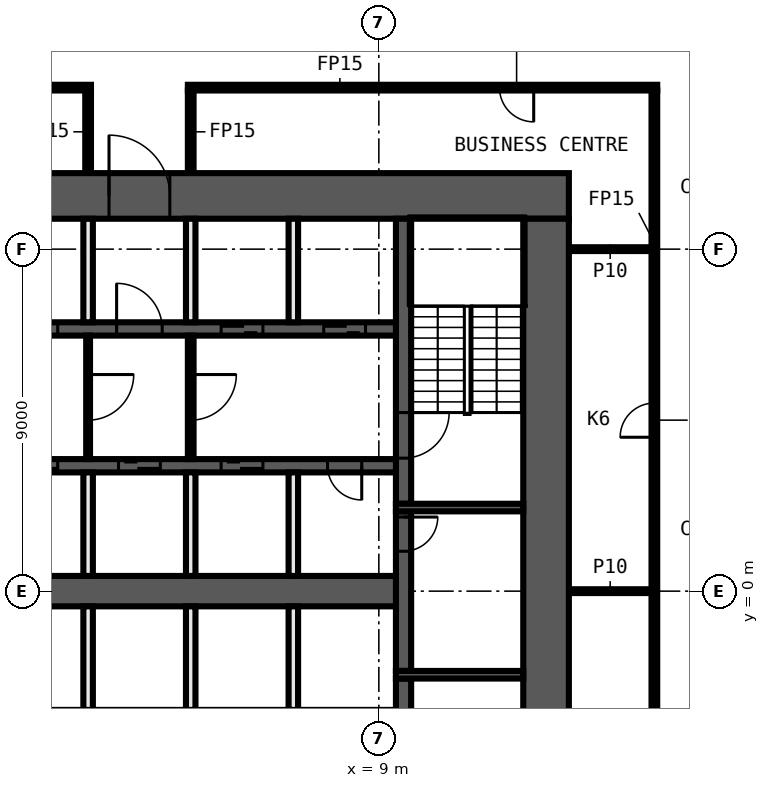
"""IFC4 building model, lengths in metres.
Left out: names, types, materials, properties, quantities, classifications, styles, units other than length and angle.
Written with IfcOpenShell. Run it as: python <this file> out.ifc"""

import sys

from ifc_helpers import new_model, si_unit, direction, frame, frame_2d, origin, place, context, subcontext, project, spatial, rectangle, extrude, element, fill, save


model = new_model("IFC4")
c1 = context("Model", 3, precision=1e-05, world=origin(), true_north=direction((0.0, 1.0)))
c2 = subcontext(c1, "Body", "Model", "MODEL_VIEW")
j1 = project(units=[si_unit("LENGTHUNIT", "METRE"), si_unit("PLANEANGLEUNIT", "RADIAN")], contexts=[c1])
p1 = place(None, origin())
s1 = spatial("IfcSite", under=j1, at=p1, CompositionType="ELEMENT")
p2 = place(p1, origin())
s2 = spatial("IfcBuilding", under=s1, at=p2, CompositionType="ELEMENT")
p3 = place(p2, frame((0.0, 0.0, 44.0)))
s3 = spatial("IfcBuildingStorey", under=s2, at=p3, CompositionType="ELEMENT", Elevation=44.0)
for number, where, z_axis, x_axis in (
    (1, (14.0, 0.0, 0.0), (0.0, 0.0, 1.0), (1.0, 0.0, 0.0)),
    (2, (14.0, 9.0, 0.0), (0.0, 0.0, 1.0), (1.0, 0.0, 0.0)),
):
    element("IfcWall", number, at=place(p3, frame(where, z_axis=z_axis, x_axis=x_axis)), inside=s3, PredefinedType="PARTITIONING", context=c2, shape_type="SweptSolid", body=[
        extrude(rectangle(XDim=2.175, YDim=0.1, at=frame_2d((1.087, 0.0))), origin(), (0.0, 0.0, 1.0), 3.3),
    ])
p4 = place(p3, frame((1.425, 13.25, 0.0), z_axis=(0.0, 0.0, 1.0), x_axis=(-1.0, 0.0, 0.0)))
e3 = element("IfcWall", 3, at=p4, inside=s3, PredefinedType="PARTITIONING", context=c2, shape_type="SweptSolid", body=[
    extrude(rectangle(XDim=17.75, YDim=0.15, at=frame_2d((8.875, 0.0))), origin(), (0.0, 0.0, 1.0), 3.3),
])
p5 = place(p4, frame((5.475, 0.0, 0.0)))
e4 = element("IfcOpeningElement", 4, at=p5, cuts=e3, PredefinedType="OPENING", context=c2, shape_type="SweptSolid", body=[
    extrude(rectangle(XDim=0.9, YDim=2.1, at=frame_2d((0.45, 1.05))), frame((0.0, 0.085, 0.0), z_axis=(0.0, -1.0, 0.0), x_axis=(1.0, 0.0, 0.0)), (0.0, 0.0, 1.0), 0.17),
])
p6 = place(p4, frame((13.6, 0.0, 0.0)))
e5 = element("IfcOpeningElement", 5, at=p6, cuts=e3, PredefinedType="OPENING", context=c2, shape_type="SweptSolid", body=[
    extrude(rectangle(XDim=0.9, YDim=2.1, at=frame_2d((0.45, 1.05))), frame((0.0, 0.085, 0.0), z_axis=(0.0, -1.0, 0.0), x_axis=(1.0, 0.0, 0.0)), (0.0, 0.0, 1.0), 0.17),
])
p7 = place(p3, frame((16.325, 13.25, 0.0), z_axis=(0.0, 0.0, 1.0), x_axis=(-1.0, 0.0, 0.0)))
e6 = element("IfcWall", 6, at=p7, inside=s3, PredefinedType="PARTITIONING", context=c2, shape_type="SweptSolid", body=[
    extrude(rectangle(XDim=12.35, YDim=0.15, at=frame_2d((6.175, 0.0))), origin(), (0.0, 0.0, 1.0), 3.3),
])
p8 = place(p7, frame((3.25, 0.0, 0.0)))
e7 = element("IfcOpeningElement", 7, at=p8, cuts=e6, PredefinedType="OPENING", context=c2, shape_type="SweptSolid", body=[
    extrude(rectangle(XDim=0.9, YDim=2.1, at=frame_2d((0.45, 1.05))), frame((0.0, 0.085, 0.0), z_axis=(0.0, -1.0, 0.0), x_axis=(1.0, 0.0, 0.0)), (0.0, 0.0, 1.0), 0.17),
])
p9 = place(p3, frame((16.25, -13.175, 0.0), z_axis=(0.0, 0.0, 1.0), x_axis=(0.0, 1.0, 0.0)))
e8 = element("IfcWall", 8, at=p9, inside=s3, PredefinedType="PARTITIONING", context=c2, shape_type="SweptSolid", body=[
    extrude(rectangle(XDim=26.35, YDim=0.15, at=frame_2d((13.175, 0.0))), origin(), (0.0, 0.0, 1.0), 3.3),
])
p10 = place(p9, frame((8.225, 0.0, 0.0)))
e9 = element("IfcOpeningElement", 9, at=p10, cuts=e8, PredefinedType="OPENING", context=c2, shape_type="SweptSolid", body=[
    extrude(rectangle(XDim=0.9, YDim=2.1, at=frame_2d((0.45, 1.05))), frame((0.0, 0.085, 0.0), z_axis=(0.0, -1.0, 0.0), x_axis=(1.0, 0.0, 0.0)), (0.0, 0.0, 1.0), 0.17),
])
p11 = place(p9, frame((17.225, 0.0, 0.0)))
e10 = element("IfcOpeningElement", 10, at=p11, cuts=e8, PredefinedType="OPENING", context=c2, shape_type="SweptSolid", body=[
    extrude(rectangle(XDim=0.9, YDim=2.1, at=frame_2d((0.45, 1.05))), frame((0.0, 0.085, 0.0), z_axis=(0.0, -1.0, 0.0), x_axis=(1.0, 0.0, 0.0)), (0.0, 0.0, 1.0), 0.17),
])
for number, where, z_axis, x_axis in (
    (11, (4.05, 11.0, 0.0), (0.0, 0.0, 1.0), (0.0, 1.0, 0.0)),
    (12, (1.35, 11.0, 0.0), (0.0, 0.0, 1.0), (0.0, 1.0, 0.0)),
):
    element("IfcWall", number, at=place(p3, frame(where, z_axis=z_axis, x_axis=x_axis)), inside=s3, PredefinedType="PARTITIONING", context=c2, shape_type="SweptSolid", body=[
        extrude(rectangle(XDim=2.175, YDim=0.15, at=frame_2d((1.087, 0.0))), origin(), (0.0, 0.0, 1.0), 3.3),
    ])
p12 = place(p3, frame((-14.0, 10.4, 0.0), z_axis=(0.0, 0.0, 1.0), x_axis=(1.0, 0.0, 0.0)))
e13 = element("IfcWall", 13, at=p12, inside=s3, PredefinedType="SHEAR", context=c2, shape_type="SweptSolid", body=[
    extrude(rectangle(XDim=28.0, YDim=1.2, at=frame_2d((14.0, 0.0))), origin(), (0.0, 0.0, 1.0), 3.3),
])
p13 = place(p12, frame((15.9, 0.0, 0.0)))
e14 = element("IfcOpeningElement", 14, at=p13, cuts=e13, PredefinedType="OPENING", context=c2, shape_type="SweptSolid", body=[
    extrude(rectangle(XDim=1.6, YDim=2.1, at=frame_2d((0.8, 1.05))), frame((0.0, 0.61, 0.0), z_axis=(0.0, -1.0, 0.0), x_axis=(1.0, 0.0, 0.0)), (0.0, 0.0, 1.0), 1.22),
])
p14 = place(p3, frame((13.4, 9.8, 0.0), z_axis=(0.0, 0.0, 1.0), x_axis=(0.0, -1.0, 0.0)))
e15 = element("IfcWall", 15, at=p14, inside=s3, PredefinedType="SHEAR", context=c2, shape_type="SweptSolid", body=[
    extrude(rectangle(XDim=19.6, YDim=1.2, at=frame_2d((9.8, 0.0))), origin(), (0.0, 0.0, 1.0), 3.3),
])
p15 = place(p3, frame((9.65, -2.3, 0.0), z_axis=(0.0, 0.0, 1.0), x_axis=(0.0, -1.0, 0.0)))
e16 = element("IfcWall", 16, at=p15, inside=s3, PredefinedType="SHEAR", context=c2, shape_type="SweptSolid", body=[
    extrude(rectangle(XDim=7.5, YDim=0.4, at=frame_2d((3.75, 0.0))), origin(), (0.0, 0.0, 1.0), 3.3),
])
p16 = place(p15, frame((1.2, 0.0, 0.0)))
e17 = element("IfcOpeningElement", 17, at=p16, cuts=e16, PredefinedType="OPENING", context=c2, shape_type="SweptSolid", body=[
    extrude(rectangle(XDim=1.2, YDim=2.1, at=frame_2d((0.6, 1.05))), frame((0.0, 0.21, 0.0), z_axis=(0.0, -1.0, 0.0), x_axis=(1.0, 0.0, 0.0)), (0.0, 0.0, 1.0), 0.42),
])
p17 = place(p3, frame((9.65, 2.1, 0.0), z_axis=(0.0, 0.0, 1.0), x_axis=(0.0, -1.0, 0.0)))
e18 = element("IfcWall", 18, at=p17, inside=s3, PredefinedType="SHEAR", context=c2, shape_type="SweptSolid", body=[
    extrude(rectangle(XDim=4.2, YDim=0.4, at=frame_2d((2.1, 0.0))), origin(), (0.0, 0.0, 1.0), 3.3),
])
p18 = place(p17, frame((0.15, 0.0, 0.0)))
e19 = element("IfcOpeningElement", 19, at=p18, cuts=e18, PredefinedType="OPENING", context=c2, shape_type="SweptSolid", body=[
    extrude(rectangle(XDim=0.9, YDim=2.1, at=frame_2d((0.45, 1.05))), frame((0.0, 0.21, 0.0), z_axis=(0.0, -1.0, 0.0), x_axis=(1.0, 0.0, 0.0)), (0.0, 0.0, 1.0), 0.42),
])
p19 = place(p3, frame((9.65, 9.8, 0.0), z_axis=(0.0, 0.0, 1.0), x_axis=(0.0, -1.0, 0.0)))
e20 = element("IfcWall", 20, at=p19, inside=s3, PredefinedType="SHEAR", context=c2, shape_type="SweptSolid", body=[
    extrude(rectangle(XDim=7.5, YDim=0.4, at=frame_2d((3.75, 0.0))), origin(), (0.0, 0.0, 1.0), 3.3),
])
p20 = place(p19, frame((5.1, 0.0, 0.0)))
e21 = element("IfcOpeningElement", 21, at=p20, cuts=e20, PredefinedType="OPENING", context=c2, shape_type="SweptSolid", body=[
    extrude(rectangle(XDim=1.2, YDim=2.1, at=frame_2d((0.6, 1.05))), frame((0.0, 0.21, 0.0), z_axis=(0.0, -1.0, 0.0), x_axis=(1.0, 0.0, 0.0)), (0.0, 0.0, 1.0), 0.42),
])
for number, where, z_axis, x_axis in (
    (22, (9.45, 2.2, 0.0), (0.0, 0.0, 1.0), (1.0, 0.0, 0.0)),
    (23, (9.45, -2.2, 0.0), (0.0, 0.0, 1.0), (1.0, 0.0, 0.0)),
):
    element("IfcWall", number, at=place(p3, frame(where, z_axis=z_axis, x_axis=x_axis)), inside=s3, PredefinedType="SHEAR", context=c2, shape_type="SweptSolid", body=[
        extrude(rectangle(XDim=3.35, YDim=0.2, at=frame_2d((1.675, 0.0))), origin(), (0.0, 0.0, 1.0), 3.3),
    ])
p21 = place(p3, frame((-9.45, 6.9, 0.0), z_axis=(0.0, 0.0, 1.0), x_axis=(1.0, 0.0, 0.0)))
e24 = element("IfcWall", 24, at=p21, inside=s3, PredefinedType="SHEAR", context=c2, shape_type="SweptSolid", body=[
    extrude(rectangle(XDim=18.9, YDim=0.35, at=frame_2d((9.45, 0.0))), origin(), (0.0, 0.0, 1.0), 3.3),
])
p22 = place(p21, frame((0.8, 0.0, 0.0)))
e25 = element("IfcOpeningElement", 25, at=p22, cuts=e24, PredefinedType="OPENING", context=c2, shape_type="SweptSolid", body=[
    extrude(rectangle(XDim=1.1, YDim=2.1, at=frame_2d((0.55, 1.05))), frame((0.0, 0.185, 0.0), z_axis=(0.0, -1.0, 0.0), x_axis=(1.0, 0.0, 0.0)), (0.0, 0.0, 1.0), 0.37),
])
p23 = place(p21, frame((3.5, 0.0, 0.0)))
e26 = element("IfcOpeningElement", 26, at=p23, cuts=e24, PredefinedType="OPENING", context=c2, shape_type="SweptSolid", body=[
    extrude(rectangle(XDim=1.1, YDim=2.1, at=frame_2d((0.55, 1.05))), frame((0.0, 0.185, 0.0), z_axis=(0.0, -1.0, 0.0), x_axis=(1.0, 0.0, 0.0)), (0.0, 0.0, 1.0), 0.37),
])
p24 = place(p21, frame((6.2, 0.0, 0.0)))
e27 = element("IfcOpeningElement", 27, at=p24, cuts=e24, PredefinedType="OPENING", context=c2, shape_type="SweptSolid", body=[
    extrude(rectangle(XDim=1.1, YDim=2.1, at=frame_2d((0.55, 1.05))), frame((0.0, 0.185, 0.0), z_axis=(0.0, -1.0, 0.0), x_axis=(1.0, 0.0, 0.0)), (0.0, 0.0, 1.0), 0.37),
])
p25 = place(p21, frame((8.9, 0.0, 0.0)))
e28 = element("IfcOpeningElement", 28, at=p25, cuts=e24, PredefinedType="OPENING", context=c2, shape_type="SweptSolid", body=[
    extrude(rectangle(XDim=1.1, YDim=2.1, at=frame_2d((0.55, 1.05))), frame((0.0, 0.185, 0.0), z_axis=(0.0, -1.0, 0.0), x_axis=(1.0, 0.0, 0.0)), (0.0, 0.0, 1.0), 0.37),
])
p26 = place(p21, frame((11.55, 0.0, 0.0)))
e29 = element("IfcOpeningElement", 29, at=p26, cuts=e24, PredefinedType="OPENING", context=c2, shape_type="SweptSolid", body=[
    extrude(rectangle(XDim=1.2, YDim=2.1, at=frame_2d((0.6, 1.05))), frame((0.0, 0.185, 0.0), z_axis=(0.0, -1.0, 0.0), x_axis=(1.0, 0.0, 0.0)), (0.0, 0.0, 1.0), 0.37),
])
p27 = place(p21, frame((14.3, 0.0, 0.0)))
e30 = element("IfcOpeningElement", 30, at=p27, cuts=e24, PredefinedType="OPENING", context=c2, shape_type="SweptSolid", body=[
    extrude(rectangle(XDim=1.1, YDim=2.1, at=frame_2d((0.55, 1.05))), frame((0.0, 0.185, 0.0), z_axis=(0.0, -1.0, 0.0), x_axis=(1.0, 0.0, 0.0)), (0.0, 0.0, 1.0), 0.37),
])
p28 = place(p21, frame((17.0, 0.0, 0.0)))
e31 = element("IfcOpeningElement", 31, at=p28, cuts=e24, PredefinedType="OPENING", context=c2, shape_type="SweptSolid", body=[
    extrude(rectangle(XDim=1.1, YDim=2.1, at=frame_2d((0.55, 1.05))), frame((0.0, 0.185, 0.0), z_axis=(0.0, -1.0, 0.0), x_axis=(1.0, 0.0, 0.0)), (0.0, 0.0, 1.0), 0.37),
])
p29 = place(p3, frame((9.45, 3.3, 0.0), z_axis=(0.0, 0.0, 1.0), x_axis=(-1.0, 0.0, 0.0)))
e32 = element("IfcWall", 32, at=p29, inside=s3, PredefinedType="SHEAR", context=c2, shape_type="SweptSolid", body=[
    extrude(rectangle(XDim=18.9, YDim=0.35, at=frame_2d((9.45, 0.0))), origin(), (0.0, 0.0, 1.0), 3.3),
])
p30 = place(p29, frame((17.0, 0.0, 0.0)))
e33 = element("IfcOpeningElement", 33, at=p30, cuts=e32, PredefinedType="OPENING", context=c2, shape_type="SweptSolid", body=[
    extrude(rectangle(XDim=1.1, YDim=2.1, at=frame_2d((0.55, 1.05))), frame((0.0, 0.185, 0.0), z_axis=(0.0, -1.0, 0.0), x_axis=(1.0, 0.0, 0.0)), (0.0, 0.0, 1.0), 0.37),
])
p31 = place(p29, frame((14.3, 0.0, 0.0)))
e34 = element("IfcOpeningElement", 34, at=p31, cuts=e32, PredefinedType="OPENING", context=c2, shape_type="SweptSolid", body=[
    extrude(rectangle(XDim=1.1, YDim=2.1, at=frame_2d((0.55, 1.05))), frame((0.0, 0.185, 0.0), z_axis=(0.0, -1.0, 0.0), x_axis=(1.0, 0.0, 0.0)), (0.0, 0.0, 1.0), 0.37),
])
p32 = place(p29, frame((11.6, 0.0, 0.0)))
e35 = element("IfcOpeningElement", 35, at=p32, cuts=e32, PredefinedType="OPENING", context=c2, shape_type="SweptSolid", body=[
    extrude(rectangle(XDim=1.1, YDim=2.1, at=frame_2d((0.55, 1.05))), frame((0.0, 0.185, 0.0), z_axis=(0.0, -1.0, 0.0), x_axis=(1.0, 0.0, 0.0)), (0.0, 0.0, 1.0), 0.37),
])
p33 = place(p29, frame((8.9, 0.0, 0.0)))
e36 = element("IfcOpeningElement", 36, at=p33, cuts=e32, PredefinedType="OPENING", context=c2, shape_type="SweptSolid", body=[
    extrude(rectangle(XDim=1.1, YDim=2.1, at=frame_2d((0.55, 1.05))), frame((0.0, 0.185, 0.0), z_axis=(0.0, -1.0, 0.0), x_axis=(1.0, 0.0, 0.0)), (0.0, 0.0, 1.0), 0.37),
])
p34 = place(p29, frame((6.2, 0.0, 0.0)))
e37 = element("IfcOpeningElement", 37, at=p34, cuts=e32, PredefinedType="OPENING", context=c2, shape_type="SweptSolid", body=[
    extrude(rectangle(XDim=1.1, YDim=2.1, at=frame_2d((0.55, 1.05))), frame((0.0, 0.185, 0.0), z_axis=(0.0, -1.0, 0.0), x_axis=(1.0, 0.0, 0.0)), (0.0, 0.0, 1.0), 0.37),
])
p35 = place(p29, frame((3.5, 0.0, 0.0)))
e38 = element("IfcOpeningElement", 38, at=p35, cuts=e32, PredefinedType="OPENING", context=c2, shape_type="SweptSolid", body=[
    extrude(rectangle(XDim=1.1, YDim=2.1, at=frame_2d((0.55, 1.05))), frame((0.0, 0.185, 0.0), z_axis=(0.0, -1.0, 0.0), x_axis=(1.0, 0.0, 0.0)), (0.0, 0.0, 1.0), 0.37),
])
p36 = place(p29, frame((0.9, 0.0, 0.0)))
e39 = element("IfcOpeningElement", 39, at=p36, cuts=e32, PredefinedType="OPENING", context=c2, shape_type="SweptSolid", body=[
    extrude(rectangle(XDim=0.9, YDim=2.1, at=frame_2d((0.45, 1.05))), frame((0.0, 0.185, 0.0), z_axis=(0.0, -1.0, 0.0), x_axis=(1.0, 0.0, 0.0)), (0.0, 0.0, 1.0), 0.37),
])
p37 = place(p3, frame((-9.45, 0.0, 0.0), z_axis=(0.0, 0.0, 1.0), x_axis=(1.0, 0.0, 0.0)))
e40 = element("IfcWall", 40, at=p37, inside=s3, PredefinedType="SHEAR", context=c2, shape_type="SweptSolid", body=[
    extrude(rectangle(XDim=18.9, YDim=0.8, at=frame_2d((9.45, 0.0))), origin(), (0.0, 0.0, 1.0), 3.3),
])
for number, where, z_axis, x_axis in (
    (41, (6.75, -3.125, 0.0), (0.0, 0.0, 1.0), (0.0, 1.0, 0.0)),
    (42, (6.75, 0.4, 0.0), (0.0, 0.0, 1.0), (0.0, 1.0, 0.0)),
    (43, (6.75, 7.075, 0.0), (0.0, 0.0, 1.0), (0.0, 1.0, 0.0)),
):
    element("IfcWall", number, at=place(p3, frame(where, z_axis=z_axis, x_axis=x_axis)), inside=s3, PredefinedType="SOLIDWALL", context=c2, shape_type="SweptSolid", body=[
        extrude(rectangle(XDim=2.725, YDim=0.25, at=frame_2d((1.363, 0.0))), origin(), (0.0, 0.0, 1.0), 3.3),
    ])
p38 = place(p3, frame((4.05, 6.725, 0.0), z_axis=(0.0, 0.0, 1.0), x_axis=(0.0, -1.0, 0.0)))
e44 = element("IfcWall", 44, at=p38, inside=s3, PredefinedType="PARTITIONING", context=c2, shape_type="SweptSolid", body=[
    extrude(rectangle(XDim=3.25, YDim=0.15, at=frame_2d((1.625, 0.0))), origin(), (0.0, 0.0, 1.0), 3.3),
])
p39 = place(p38, frame((1.025, 0.0, 0.0)))
e45 = element("IfcOpeningElement", 45, at=p39, cuts=e44, PredefinedType="OPENING", context=c2, shape_type="SweptSolid", body=[
    extrude(rectangle(XDim=1.2, YDim=2.1, at=frame_2d((0.6, 1.05))), frame((0.0, 0.085, 0.0), z_axis=(0.0, -1.0, 0.0), x_axis=(1.0, 0.0, 0.0)), (0.0, 0.0, 1.0), 0.17),
])
for number, where, z_axis, x_axis in (
    (46, (4.05, -3.125, 0.0), (0.0, 0.0, 1.0), (0.0, 1.0, 0.0)),
    (47, (4.05, 0.4, 0.0), (0.0, 0.0, 1.0), (0.0, 1.0, 0.0)),
    (48, (4.05, 7.075, 0.0), (0.0, 0.0, 1.0), (0.0, 1.0, 0.0)),
):
    element("IfcWall", number, at=place(p3, frame(where, z_axis=z_axis, x_axis=x_axis)), inside=s3, PredefinedType="SOLIDWALL", context=c2, shape_type="SweptSolid", body=[
        extrude(rectangle(XDim=2.725, YDim=0.25, at=frame_2d((1.363, 0.0))), origin(), (0.0, 0.0, 1.0), 3.3),
    ])
p40 = place(p3, frame((1.35, 6.725, 0.0), z_axis=(0.0, 0.0, 1.0), x_axis=(0.0, -1.0, 0.0)))
e49 = element("IfcWall", 49, at=p40, inside=s3, PredefinedType="PARTITIONING", context=c2, shape_type="SweptSolid", body=[
    extrude(rectangle(XDim=3.25, YDim=0.1, at=frame_2d((1.625, 0.0))), origin(), (0.0, 0.0, 1.0), 3.3),
])
p41 = place(p40, frame((1.025, 0.0, 0.0)))
e50 = element("IfcOpeningElement", 50, at=p41, cuts=e49, PredefinedType="OPENING", context=c2, shape_type="SweptSolid", body=[
    extrude(rectangle(XDim=1.2, YDim=2.1, at=frame_2d((0.6, 1.05))), frame((0.0, 0.06, 0.0), z_axis=(0.0, -1.0, 0.0), x_axis=(1.0, 0.0, 0.0)), (0.0, 0.0, 1.0), 0.12),
])
for number, where, z_axis, x_axis in (
    (51, (1.35, -3.125, 0.0), (0.0, 0.0, 1.0), (0.0, 1.0, 0.0)),
    (52, (1.35, 0.4, 0.0), (0.0, 0.0, 1.0), (0.0, 1.0, 0.0)),
    (53, (1.35, 7.075, 0.0), (0.0, 0.0, 1.0), (0.0, 1.0, 0.0)),
):
    element("IfcWall", number, at=place(p3, frame(where, z_axis=z_axis, x_axis=x_axis)), inside=s3, PredefinedType="SOLIDWALL", context=c2, shape_type="SweptSolid", body=[
        extrude(rectangle(XDim=2.725, YDim=0.25, at=frame_2d((1.363, 0.0))), origin(), (0.0, 0.0, 1.0), 3.3),
    ])
p42 = place(p11, origin())
e54 = element("IfcDoor", 54, at=p42, inside=s3, OperationType="SINGLE_SWING_RIGHT", PredefinedType="DOOR", context=c2, shape_type="SweptSolid", body=[
    extrude(rectangle(XDim=0.9, YDim=2.1, at=frame_2d((0.45, 1.05))), frame((0.0, 0.025, 0.0), z_axis=(0.0, -1.0, 0.0), x_axis=(1.0, 0.0, 0.0)), (0.0, 0.0, 1.0), 0.05),
])
fill(e10, e54)
p43 = place(p8, origin())
e55 = element("IfcDoor", 55, at=p43, inside=s3, OperationType="SINGLE_SWING_LEFT", PredefinedType="DOOR", context=c2, shape_type="SweptSolid", body=[
    extrude(rectangle(XDim=0.9, YDim=2.1, at=frame_2d((0.45, 1.05))), frame((0.0, 0.025, 0.0), z_axis=(0.0, -1.0, 0.0), x_axis=(1.0, 0.0, 0.0)), (0.0, 0.0, 1.0), 0.05),
])
fill(e7, e55)
p44 = place(p18, origin())
e56 = element("IfcDoor", 56, at=p44, inside=s3, OperationType="SINGLE_SWING_RIGHT", PredefinedType="DOOR", context=c2, shape_type="SweptSolid", body=[
    extrude(rectangle(XDim=0.9, YDim=2.1, at=frame_2d((0.45, 1.05))), frame((0.0, 0.025, 0.0), z_axis=(0.0, -1.0, 0.0), x_axis=(1.0, 0.0, 0.0)), (0.0, 0.0, 1.0), 0.05),
])
fill(e19, e56)
p45 = place(p25, origin())
e57 = element("IfcDoor", 57, at=p45, inside=s3, OperationType="DOUBLE_DOOR_SLIDING", PredefinedType="DOOR", context=c2, shape_type="SweptSolid", body=[
    extrude(rectangle(XDim=1.1, YDim=2.1, at=frame_2d((0.55, 1.05))), frame((0.0, 0.025, 0.0), z_axis=(0.0, -1.0, 0.0), x_axis=(1.0, 0.0, 0.0)), (0.0, 0.0, 1.0), 0.05),
])
fill(e28, e57)
p46 = place(p13, origin())
e58 = element("IfcDoor", 58, at=p46, inside=s3, OperationType="DOUBLE_DOOR_SINGLE_SWING", PredefinedType="DOOR", context=c2, shape_type="SweptSolid", body=[
    extrude(rectangle(XDim=1.6, YDim=2.1, at=frame_2d((0.8, 1.05))), frame((0.0, 0.025, 0.0), z_axis=(0.0, -1.0, 0.0), x_axis=(1.0, 0.0, 0.0)), (0.0, 0.0, 1.0), 0.05),
])
fill(e14, e58)
p47 = place(p26, origin())
e59 = element("IfcDoor", 59, at=p47, inside=s3, OperationType="SINGLE_SWING_LEFT", PredefinedType="DOOR", context=c2, shape_type="SweptSolid", body=[
    extrude(rectangle(XDim=1.2, YDim=2.1, at=frame_2d((0.6, 1.05))), frame((0.0, 0.025, 0.0), z_axis=(0.0, -1.0, 0.0), x_axis=(1.0, 0.0, 0.0)), (0.0, 0.0, 1.0), 0.05),
])
fill(e29, e59)
p48 = place(p27, origin())
e60 = element("IfcDoor", 60, at=p48, inside=s3, OperationType="DOUBLE_DOOR_SLIDING", PredefinedType="DOOR", context=c2, shape_type="SweptSolid", body=[
    extrude(rectangle(XDim=1.1, YDim=2.1, at=frame_2d((0.55, 1.05))), frame((0.0, 0.025, 0.0), z_axis=(0.0, -1.0, 0.0), x_axis=(1.0, 0.0, 0.0)), (0.0, 0.0, 1.0), 0.05),
])
fill(e30, e60)
p49 = place(p28, origin())
e61 = element("IfcDoor", 61, at=p49, inside=s3, OperationType="DOUBLE_DOOR_SLIDING", PredefinedType="DOOR", context=c2, shape_type="SweptSolid", body=[
    extrude(rectangle(XDim=1.1, YDim=2.1, at=frame_2d((0.55, 1.05))), frame((0.0, 0.025, 0.0), z_axis=(0.0, -1.0, 0.0), x_axis=(1.0, 0.0, 0.0)), (0.0, 0.0, 1.0), 0.05),
])
fill(e31, e61)
p50 = place(p33, origin())
e62 = element("IfcDoor", 62, at=p50, inside=s3, OperationType="DOUBLE_DOOR_SLIDING", PredefinedType="DOOR", context=c2, shape_type="SweptSolid", body=[
    extrude(rectangle(XDim=1.1, YDim=2.1, at=frame_2d((0.55, 1.05))), frame((0.0, 0.025, 0.0), z_axis=(0.0, -1.0, 0.0), x_axis=(1.0, 0.0, 0.0)), (0.0, 0.0, 1.0), 0.05),
])
fill(e36, e62)
p51 = place(p34, origin())
e63 = element("IfcDoor", 63, at=p51, inside=s3, OperationType="DOUBLE_DOOR_SLIDING", PredefinedType="DOOR", context=c2, shape_type="SweptSolid", body=[
    extrude(rectangle(XDim=1.1, YDim=2.1, at=frame_2d((0.55, 1.05))), frame((0.0, 0.025, 0.0), z_axis=(0.0, -1.0, 0.0), x_axis=(1.0, 0.0, 0.0)), (0.0, 0.0, 1.0), 0.05),
])
fill(e37, e63)
p52 = place(p35, origin())
e64 = element("IfcDoor", 64, at=p52, inside=s3, OperationType="DOUBLE_DOOR_SLIDING", PredefinedType="DOOR", context=c2, shape_type="SweptSolid", body=[
    extrude(rectangle(XDim=1.1, YDim=2.1, at=frame_2d((0.55, 1.05))), frame((0.0, 0.025, 0.0), z_axis=(0.0, -1.0, 0.0), x_axis=(1.0, 0.0, 0.0)), (0.0, 0.0, 1.0), 0.05),
])
fill(e38, e64)
p53 = place(p36, origin())
e65 = element("IfcDoor", 65, at=p53, inside=s3, OperationType="SINGLE_SWING_LEFT", PredefinedType="DOOR", context=c2, shape_type="SweptSolid", body=[
    extrude(rectangle(XDim=0.9, YDim=2.1, at=frame_2d((0.45, 1.05))), frame((0.0, 0.025, 0.0), z_axis=(0.0, -1.0, 0.0), x_axis=(1.0, 0.0, 0.0)), (0.0, 0.0, 1.0), 0.05),
])
fill(e39, e65)
p54 = place(p20, origin())
e66 = element("IfcDoor", 66, at=p54, inside=s3, OperationType="SINGLE_SWING_LEFT", PredefinedType="DOOR", context=c2, shape_type="SweptSolid", body=[
    extrude(rectangle(XDim=1.2, YDim=2.1, at=frame_2d((0.6, 1.05))), frame((0.0, 0.025, 0.0), z_axis=(0.0, -1.0, 0.0), x_axis=(1.0, 0.0, 0.0)), (0.0, 0.0, 1.0), 0.05),
])
fill(e21, e66)
p55 = place(p41, origin())
e67 = element("IfcDoor", 67, at=p55, inside=s3, OperationType="SINGLE_SWING_LEFT", PredefinedType="DOOR", context=c2, shape_type="SweptSolid", body=[
    extrude(rectangle(XDim=1.2, YDim=2.1, at=frame_2d((0.6, 1.05))), frame((0.0, 0.025, 0.0), z_axis=(0.0, -1.0, 0.0), x_axis=(1.0, 0.0, 0.0)), (0.0, 0.0, 1.0), 0.05),
])
fill(e50, e67)
p56 = place(p39, origin())
e68 = element("IfcDoor", 68, at=p56, inside=s3, OperationType="SINGLE_SWING_RIGHT", PredefinedType="DOOR", context=c2, shape_type="SweptSolid", body=[
    extrude(rectangle(XDim=1.2, YDim=2.1, at=frame_2d((0.6, 1.05))), frame((0.0, 0.025, 0.0), z_axis=(0.0, -1.0, 0.0), x_axis=(1.0, 0.0, 0.0)), (0.0, 0.0, 1.0), 0.05),
])
fill(e45, e68)
save(model, sys.argv[1])
